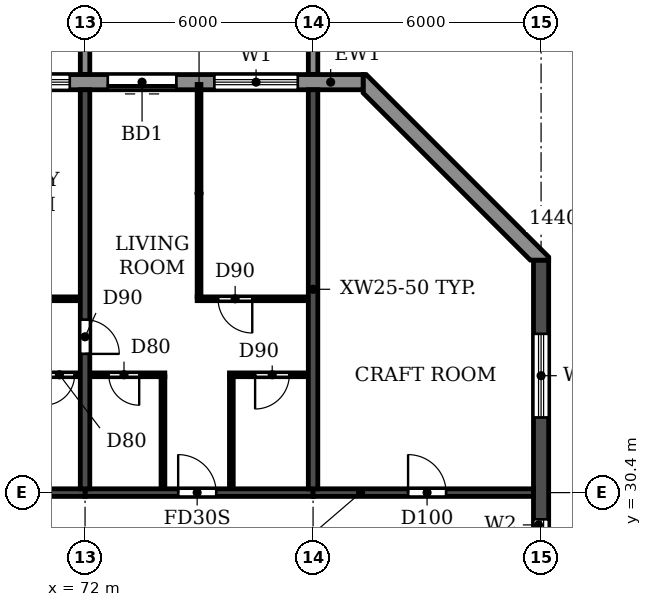
"""IFC4 building model, lengths in metres.
Left out: names, types, materials, properties, quantities, classifications, styles, units other than length and angle.
Written with IfcOpenShell. Run it as: python <this file> out.ifc"""

import sys

from ifc_helpers import new_model, si_unit, direction, frame, frame_2d, origin, place, context, subcontext, project, spatial, polyline, rectangle, outline, extrude, source, transform, mapped, element, fill, save


model = new_model("IFC4")
c1 = context("Model", 3, precision=1e-05, world=origin(), true_north=direction((0.0, 1.0)))
c2 = subcontext(c1, "Body", "Model", "MODEL_VIEW")
j1 = project(units=[si_unit("LENGTHUNIT", "METRE"), si_unit("PLANEANGLEUNIT", "RADIAN")], contexts=[c1])
p1 = place(None, origin())
s1 = spatial("IfcSite", under=j1, at=p1, CompositionType="ELEMENT")
p2 = place(p1, origin())
s2 = spatial("IfcBuilding", under=s1, at=p2, CompositionType="ELEMENT")
p3 = place(p2, frame((0.0, 0.0, 208.2)))
s3 = spatial("IfcBuildingStorey", under=s2, at=p3, CompositionType="ELEMENT", Elevation=208.2)
p4 = place(p3, frame((72.0, 30.5, 0.0), z_axis=(0.0, 0.0, 1.0), x_axis=(0.0, 1.0, 0.0)))
e1 = element("IfcWall", 1, at=p4, inside=s3, PredefinedType="SHEAR", context=c2, shape_type="SweptSolid", body=[
    extrude(rectangle(XDim=10.5, YDim=0.25, at=frame_2d((5.25, 0.0))), origin(), (0.0, 0.0, 1.0), 3.0),
])
p5 = place(p4, frame((3.55, 0.0, 0.0)))
e2 = element("IfcOpeningElement", 2, at=p5, cuts=e1, PredefinedType="OPENING", context=c2, shape_type="SweptSolid", body=[
    extrude(rectangle(XDim=0.9, YDim=2.1, at=frame_2d((0.45, 1.05))), frame((0.0, 0.135, 0.0), z_axis=(0.0, -1.0, 0.0), x_axis=(1.0, 0.0, 0.0)), (0.0, 0.0, 1.0), 0.27),
])
p6 = place(p3, frame((78.0, 30.5, 0.0), z_axis=(0.0, 0.0, 1.0), x_axis=(0.0, 1.0, 0.0)))
e3 = element("IfcWall", 3, at=p6, inside=s3, PredefinedType="SHEAR", context=c2, shape_type="SweptSolid", body=[
    extrude(rectangle(XDim=10.5, YDim=0.25, at=frame_2d((5.25, 0.0))), origin(), (0.0, 0.0, 1.0), 3.0),
])
p7 = place(p3, frame((84.0, 4.683, 0.0), z_axis=(0.0, 0.0, 1.0), x_axis=(0.0, 1.0, 0.0)))
e4 = element("IfcWall", 4, at=p7, inside=s3, PredefinedType="SHEAR", context=c2, shape_type="SweptSolid", body=[
    extrude(rectangle(XDim=31.834, YDim=0.4, at=frame_2d((15.917, 0.0))), origin(), (0.0, 0.0, 1.0), 3.0),
])
p8 = place(p7, frame((23.817, 0.0, 0.9)))
e5 = element("IfcOpeningElement", 5, at=p8, cuts=e4, PredefinedType="OPENING", context=c2, shape_type="SweptSolid", body=[
    extrude(rectangle(XDim=1.2, YDim=1.5, at=frame_2d((0.6, 0.75))), frame((0.0, 0.21, 0.0), z_axis=(0.0, -1.0, 0.0), x_axis=(1.0, 0.0, 0.0)), (0.0, 0.0, 1.0), 0.42),
])
p9 = place(p7, frame((8.017, 0.0, 0.9)))
e6 = element("IfcOpeningElement", 6, at=p9, cuts=e4, PredefinedType="OPENING", context=c2, shape_type="SweptSolid", body=[
    extrude(rectangle(XDim=1.2, YDim=1.5, at=frame_2d((0.6, 0.75))), frame((0.0, 0.21, 0.0), z_axis=(0.0, -1.0, 0.0), x_axis=(1.0, 0.0, 0.0)), (0.0, 0.0, 1.0), 0.42),
])
p10 = place(p7, frame((27.694, 0.0, 0.6)))
e7 = element("IfcOpeningElement", 7, at=p10, cuts=e4, PredefinedType="OPENING", context=c2, shape_type="SweptSolid", body=[
    extrude(rectangle(XDim=2.2, YDim=1.8, at=frame_2d((1.1, 0.9))), frame((0.0, 0.21, 0.0), z_axis=(0.0, -1.0, 0.0), x_axis=(1.0, 0.0, 0.0)), (0.0, 0.0, 1.0), 0.42),
])
p11 = place(p7, frame((2.541, 0.0, 0.6)))
e8 = element("IfcOpeningElement", 8, at=p11, cuts=e4, PredefinedType="OPENING", context=c2, shape_type="SweptSolid", body=[
    extrude(rectangle(XDim=2.2, YDim=1.8, at=frame_2d((1.1, 0.9))), frame((0.0, 0.21, 0.0), z_axis=(0.0, -1.0, 0.0), x_axis=(1.0, 0.0, 0.0)), (0.0, 0.0, 1.0), 0.42),
])
p12 = place(p7, frame((15.917, 0.0, 0.9)))
e9 = element("IfcOpeningElement", 9, at=p12, cuts=e4, PredefinedType="OPENING", context=c2, shape_type="SweptSolid", body=[
    extrude(rectangle(XDim=1.2, YDim=1.5, at=frame_2d((0.6, 0.75))), frame((0.0, 0.21, 0.0), z_axis=(0.0, -1.0, 0.0), x_axis=(1.0, 0.0, 0.0)), (0.0, 0.0, 1.0), 0.42),
])
p13 = place(p3, frame((66.0, 30.4, 0.0), z_axis=(0.0, 0.0, 1.0), x_axis=(1.0, 0.0, 0.0)))
e10 = element("IfcWall", 10, at=p13, inside=s3, PredefinedType="SHEAR", context=c2, shape_type="SweptSolid", body=[
    extrude(rectangle(XDim=6.0, YDim=0.2, at=frame_2d((3.0, 0.0))), origin(), (0.0, 0.0, 1.0), 2.4),
])
p14 = place(p3, frame((72.0, 30.4, 0.0), z_axis=(0.0, 0.0, 1.0), x_axis=(1.0, 0.0, 0.0)))
e11 = element("IfcWall", 11, at=p14, inside=s3, PredefinedType="SHEAR", context=c2, shape_type="SweptSolid", body=[
    extrude(rectangle(XDim=6.0, YDim=0.2, at=frame_2d((3.0, 0.0))), origin(), (0.0, 0.0, 1.0), 2.4),
])
p15 = place(p14, frame((2.45, 0.0, 0.0)))
e12 = element("IfcOpeningElement", 12, at=p15, cuts=e11, PredefinedType="OPENING", context=c2, shape_type="SweptSolid", body=[
    extrude(rectangle(XDim=1.0, YDim=2.1, at=frame_2d((0.5, 1.05))), frame((0.0, 0.11, 0.0), z_axis=(0.0, -1.0, 0.0), x_axis=(1.0, 0.0, 0.0)), (0.0, 0.0, 1.0), 0.22),
])
p16 = place(p3, frame((78.0, 30.4, 0.0), z_axis=(0.0, 0.0, 1.0), x_axis=(1.0, 0.0, 0.0)))
e13 = element("IfcWall", 13, at=p16, inside=s3, PredefinedType="SHEAR", context=c2, shape_type="SweptSolid", body=[
    extrude(rectangle(XDim=5.8, YDim=0.2, at=frame_2d((2.9, 0.0))), origin(), (0.0, 0.0, 1.0), 2.4),
])
p17 = place(p16, frame((2.5, 0.0, 0.0)))
e14 = element("IfcOpeningElement", 14, at=p17, cuts=e13, PredefinedType="OPENING", context=c2, shape_type="SweptSolid", body=[
    extrude(rectangle(XDim=1.0, YDim=2.1, at=frame_2d((0.5, 1.05))), frame((0.0, 0.11, 0.0), z_axis=(0.0, -1.0, 0.0), x_axis=(1.0, 0.0, 0.0)), (0.0, 0.0, 1.0), 0.22),
])
p18 = place(p3, origin())
e15 = element("IfcWall", 15, at=p18, inside=s3, PredefinedType="STANDARD", context=c2, shape_type="SweptSolid", body=[
    extrude(outline(polyline([(84.2, 36.517), (84.2, 36.6), (79.4, 41.4), (79.317, 41.4), (79.317, 40.917), (83.717, 36.517), (84.2, 36.517)])), origin(), (0.0, 0.0, 1.0), 3.0),
])
p19 = place(p3, frame((79.317, 41.2, 0.0), z_axis=(0.0, 0.0, 1.0), x_axis=(-1.0, 0.0, 0.0)))
e16 = element("IfcWall", 16, at=p19, inside=s3, PredefinedType="STANDARD", context=c2, shape_type="SweptSolid", body=[
    extrude(rectangle(XDim=56.634, YDim=0.4, at=frame_2d((28.317, 0.0))), origin(), (0.0, 0.0, 1.0), 3.0),
])
p20 = place(p19, frame((52.717, 0.0, 0.9)))
e17 = element("IfcOpeningElement", 17, at=p20, cuts=e16, PredefinedType="OPENING", context=c2, shape_type="SweptSolid", body=[
    extrude(rectangle(XDim=2.2, YDim=1.5, at=frame_2d((1.1, 0.75))), frame((0.0, 0.21, 0.0), z_axis=(0.0, -1.0, 0.0), x_axis=(1.0, 0.0, 0.0)), (0.0, 0.0, 1.0), 0.42),
])
p21 = place(p19, frame((49.917, 0.0, 0.0)))
e18 = element("IfcOpeningElement", 18, at=p21, cuts=e16, PredefinedType="OPENING", context=c2, shape_type="SweptSolid", body=[
    extrude(rectangle(XDim=1.8, YDim=2.4, at=frame_2d((0.9, 1.2))), frame((0.0, 0.21, 0.0), z_axis=(0.0, -1.0, 0.0), x_axis=(1.0, 0.0, 0.0)), (0.0, 0.0, 1.0), 0.42),
])
p22 = place(p19, frame((46.717, 0.0, 0.9)))
e19 = element("IfcOpeningElement", 19, at=p22, cuts=e16, PredefinedType="OPENING", context=c2, shape_type="SweptSolid", body=[
    extrude(rectangle(XDim=2.2, YDim=1.5, at=frame_2d((1.1, 0.75))), frame((0.0, 0.21, 0.0), z_axis=(0.0, -1.0, 0.0), x_axis=(1.0, 0.0, 0.0)), (0.0, 0.0, 1.0), 0.42),
])
p23 = place(p19, frame((43.917, 0.0, 0.0)))
e20 = element("IfcOpeningElement", 20, at=p23, cuts=e16, PredefinedType="OPENING", context=c2, shape_type="SweptSolid", body=[
    extrude(rectangle(XDim=1.8, YDim=2.4, at=frame_2d((0.9, 1.2))), frame((0.0, 0.21, 0.0), z_axis=(0.0, -1.0, 0.0), x_axis=(1.0, 0.0, 0.0)), (0.0, 0.0, 1.0), 0.42),
])
p24 = place(p19, frame((40.917, 0.0, 0.0)))
e21 = element("IfcOpeningElement", 21, at=p24, cuts=e16, PredefinedType="OPENING", context=c2, shape_type="SweptSolid", body=[
    extrude(rectangle(XDim=1.8, YDim=2.4, at=frame_2d((0.9, 1.2))), frame((0.0, 0.21, 0.0), z_axis=(0.0, -1.0, 0.0), x_axis=(1.0, 0.0, 0.0)), (0.0, 0.0, 1.0), 0.42),
])
p25 = place(p19, frame((37.717, 0.0, 0.9)))
e22 = element("IfcOpeningElement", 22, at=p25, cuts=e16, PredefinedType="OPENING", context=c2, shape_type="SweptSolid", body=[
    extrude(rectangle(XDim=2.2, YDim=1.5, at=frame_2d((1.1, 0.75))), frame((0.0, 0.21, 0.0), z_axis=(0.0, -1.0, 0.0), x_axis=(1.0, 0.0, 0.0)), (0.0, 0.0, 1.0), 0.42),
])
p26 = place(p19, frame((34.717, 0.0, 0.9)))
e23 = element("IfcOpeningElement", 23, at=p26, cuts=e16, PredefinedType="OPENING", context=c2, shape_type="SweptSolid", body=[
    extrude(rectangle(XDim=2.2, YDim=1.5, at=frame_2d((1.1, 0.75))), frame((0.0, 0.21, 0.0), z_axis=(0.0, -1.0, 0.0), x_axis=(1.0, 0.0, 0.0)), (0.0, 0.0, 1.0), 0.42),
])
p27 = place(p19, frame((31.717, 0.0, 0.9)))
e24 = element("IfcOpeningElement", 24, at=p27, cuts=e16, PredefinedType="OPENING", context=c2, shape_type="SweptSolid", body=[
    extrude(rectangle(XDim=2.2, YDim=1.5, at=frame_2d((1.1, 0.75))), frame((0.0, 0.21, 0.0), z_axis=(0.0, -1.0, 0.0), x_axis=(1.0, 0.0, 0.0)), (0.0, 0.0, 1.0), 0.42),
])
p28 = place(p19, frame((28.717, 0.0, 0.9)))
e25 = element("IfcOpeningElement", 25, at=p28, cuts=e16, PredefinedType="OPENING", context=c2, shape_type="SweptSolid", body=[
    extrude(rectangle(XDim=2.2, YDim=1.5, at=frame_2d((1.1, 0.75))), frame((0.0, 0.21, 0.0), z_axis=(0.0, -1.0, 0.0), x_axis=(1.0, 0.0, 0.0)), (0.0, 0.0, 1.0), 0.42),
])
p29 = place(p19, frame((25.917, 0.0, 0.0)))
e26 = element("IfcOpeningElement", 26, at=p29, cuts=e16, PredefinedType="OPENING", context=c2, shape_type="SweptSolid", body=[
    extrude(rectangle(XDim=1.8, YDim=2.4, at=frame_2d((0.9, 1.2))), frame((0.0, 0.21, 0.0), z_axis=(0.0, -1.0, 0.0), x_axis=(1.0, 0.0, 0.0)), (0.0, 0.0, 1.0), 0.42),
])
p30 = place(p19, frame((22.717, 0.0, 0.9)))
e27 = element("IfcOpeningElement", 27, at=p30, cuts=e16, PredefinedType="OPENING", context=c2, shape_type="SweptSolid", body=[
    extrude(rectangle(XDim=2.2, YDim=1.5, at=frame_2d((1.1, 0.75))), frame((0.0, 0.21, 0.0), z_axis=(0.0, -1.0, 0.0), x_axis=(1.0, 0.0, 0.0)), (0.0, 0.0, 1.0), 0.42),
])
p31 = place(p19, frame((19.717, 0.0, 0.9)))
e28 = element("IfcOpeningElement", 28, at=p31, cuts=e16, PredefinedType="OPENING", context=c2, shape_type="SweptSolid", body=[
    extrude(rectangle(XDim=2.2, YDim=1.5, at=frame_2d((1.1, 0.75))), frame((0.0, 0.21, 0.0), z_axis=(0.0, -1.0, 0.0), x_axis=(1.0, 0.0, 0.0)), (0.0, 0.0, 1.0), 0.42),
])
p32 = place(p19, frame((16.917, 0.0, 0.0)))
e29 = element("IfcOpeningElement", 29, at=p32, cuts=e16, PredefinedType="OPENING", context=c2, shape_type="SweptSolid", body=[
    extrude(rectangle(XDim=1.8, YDim=2.4, at=frame_2d((0.9, 1.2))), frame((0.0, 0.21, 0.0), z_axis=(0.0, -1.0, 0.0), x_axis=(1.0, 0.0, 0.0)), (0.0, 0.0, 1.0), 0.42),
])
p33 = place(p19, frame((13.717, 0.0, 0.9)))
e30 = element("IfcOpeningElement", 30, at=p33, cuts=e16, PredefinedType="OPENING", context=c2, shape_type="SweptSolid", body=[
    extrude(rectangle(XDim=2.2, YDim=1.5, at=frame_2d((1.1, 0.75))), frame((0.0, 0.21, 0.0), z_axis=(0.0, -1.0, 0.0), x_axis=(1.0, 0.0, 0.0)), (0.0, 0.0, 1.0), 0.42),
])
p34 = place(p19, frame((10.717, 0.0, 0.9)))
e31 = element("IfcOpeningElement", 31, at=p34, cuts=e16, PredefinedType="OPENING", context=c2, shape_type="SweptSolid", body=[
    extrude(rectangle(XDim=2.2, YDim=1.5, at=frame_2d((1.1, 0.75))), frame((0.0, 0.21, 0.0), z_axis=(0.0, -1.0, 0.0), x_axis=(1.0, 0.0, 0.0)), (0.0, 0.0, 1.0), 0.42),
])
p35 = place(p19, frame((7.717, 0.0, 0.9)))
e32 = element("IfcOpeningElement", 32, at=p35, cuts=e16, PredefinedType="OPENING", context=c2, shape_type="SweptSolid", body=[
    extrude(rectangle(XDim=2.2, YDim=1.5, at=frame_2d((1.1, 0.75))), frame((0.0, 0.21, 0.0), z_axis=(0.0, -1.0, 0.0), x_axis=(1.0, 0.0, 0.0)), (0.0, 0.0, 1.0), 0.42),
])
p36 = place(p19, frame((4.917, 0.0, 0.0)))
e33 = element("IfcOpeningElement", 33, at=p36, cuts=e16, PredefinedType="OPENING", context=c2, shape_type="SweptSolid", body=[
    extrude(rectangle(XDim=1.8, YDim=2.4, at=frame_2d((0.9, 1.2))), frame((0.0, 0.21, 0.0), z_axis=(0.0, -1.0, 0.0), x_axis=(1.0, 0.0, 0.0)), (0.0, 0.0, 1.0), 0.42),
])
p37 = place(p19, frame((1.717, 0.0, 0.9)))
e34 = element("IfcOpeningElement", 34, at=p37, cuts=e16, PredefinedType="OPENING", context=c2, shape_type="SweptSolid", body=[
    extrude(rectangle(XDim=2.2, YDim=1.5, at=frame_2d((1.1, 0.75))), frame((0.0, 0.21, 0.0), z_axis=(0.0, -1.0, 0.0), x_axis=(1.0, 0.0, 0.0)), (0.0, 0.0, 1.0), 0.42),
])
m1 = source(origin(), c2, "Body", "SweptSolid", [
    extrude(outline(polyline([(0.0, 0.0), (0.25, 0.0), (0.25, 3.1), (0.0, 3.1), (0.0, 0.0)])), origin(), (0.0, 0.0, 1.0), 3.1),
])
for number, where in (
    (35, (71.875, 41.4, 0.0)),
    (36, (77.875, 41.4, 0.0)),
):
    element("IfcWall", number, at=place(p3, frame(where)), inside=s3, PredefinedType="STANDARD", context=c2, shape_type="MappedRepresentation", body=[
        mapped(m1, transform((0.0, 0.0, 0.0))),
    ])
p38 = place(p3, frame((69.1, 33.5, 0.0), z_axis=(0.0, 0.0, 1.0), x_axis=(1.0, 0.0, 0.0)))
e37 = element("IfcWall", 37, at=p38, inside=s3, PredefinedType="PARTITIONING", context=c2, shape_type="SweptSolid", body=[
    extrude(rectangle(XDim=2.765, YDim=0.1, at=frame_2d((1.382, 0.0))), origin(), (0.0, 0.0, 1.0), 3.0),
])
p39 = place(p38, frame((0.325, 0.0, 0.0)))
e38 = element("IfcOpeningElement", 38, at=p39, cuts=e37, PredefinedType="OPENING", context=c2, shape_type="SweptSolid", body=[
    extrude(rectangle(XDim=0.8, YDim=2.1, at=frame_2d((0.4, 1.05))), frame((0.0, 0.06, 0.0), z_axis=(0.0, -1.0, 0.0), x_axis=(1.0, 0.0, 0.0)), (0.0, 0.0, 1.0), 0.12),
])
p40 = place(p38, frame((1.825, 0.0, 0.0)))
e39 = element("IfcOpeningElement", 39, at=p40, cuts=e37, PredefinedType="OPENING", context=c2, shape_type="SweptSolid", body=[
    extrude(rectangle(XDim=0.8, YDim=2.1, at=frame_2d((0.4, 1.05))), frame((0.0, 0.06, 0.0), z_axis=(0.0, -1.0, 0.0), x_axis=(1.0, 0.0, 0.0)), (0.0, 0.0, 1.0), 0.12),
])
p41 = place(p3, frame((72.135, 33.5, 0.0), z_axis=(0.0, 0.0, 1.0), x_axis=(1.0, 0.0, 0.0)))
e40 = element("IfcWall", 40, at=p41, inside=s3, PredefinedType="PARTITIONING", context=c2, shape_type="SweptSolid", body=[
    extrude(rectangle(XDim=1.965, YDim=0.1, at=frame_2d((0.982, 0.0))), origin(), (0.0, 0.0, 1.0), 3.0),
])
p42 = place(p41, frame((0.49, 0.0, 0.0)))
e41 = element("IfcOpeningElement", 41, at=p42, cuts=e40, PredefinedType="OPENING", context=c2, shape_type="SweptSolid", body=[
    extrude(rectangle(XDim=0.8, YDim=2.1, at=frame_2d((0.4, 1.05))), frame((0.0, 0.06, 0.0), z_axis=(0.0, -1.0, 0.0), x_axis=(1.0, 0.0, 0.0)), (0.0, 0.0, 1.0), 0.12),
])
p43 = place(p3, frame((75.8, 33.5, 0.0), z_axis=(0.0, 0.0, 1.0), x_axis=(1.0, 0.0, 0.0)))
e42 = element("IfcWall", 42, at=p43, inside=s3, PredefinedType="PARTITIONING", context=c2, shape_type="SweptSolid", body=[
    extrude(rectangle(XDim=2.065, YDim=0.1, at=frame_2d((1.032, 0.0))), origin(), (0.0, 0.0, 1.0), 3.0),
])
p44 = place(p43, frame((0.675, 0.0, 0.0)))
e43 = element("IfcOpeningElement", 43, at=p44, cuts=e42, PredefinedType="OPENING", context=c2, shape_type="SweptSolid", body=[
    extrude(rectangle(XDim=0.9, YDim=2.1, at=frame_2d((0.45, 1.05))), frame((0.0, 0.06, 0.0), z_axis=(0.0, -1.0, 0.0), x_axis=(1.0, 0.0, 0.0)), (0.0, 0.0, 1.0), 0.12),
])
p45 = place(p3, frame((69.1, 35.5, 0.0), z_axis=(0.0, 0.0, 1.0), x_axis=(1.0, 0.0, 0.0)))
e44 = element("IfcWall", 44, at=p45, inside=s3, PredefinedType="PARTITIONING", context=c2, shape_type="SweptSolid", body=[
    extrude(rectangle(XDim=2.765, YDim=0.1, at=frame_2d((1.382, 0.0))), origin(), (0.0, 0.0, 1.0), 3.0),
])
p46 = place(p45, frame((0.4, 0.0, 0.0)))
e45 = element("IfcOpeningElement", 45, at=p46, cuts=e44, PredefinedType="OPENING", context=c2, shape_type="SweptSolid", body=[
    extrude(rectangle(XDim=0.9, YDim=2.1, at=frame_2d((0.45, 1.05))), frame((0.0, 0.06, 0.0), z_axis=(0.0, -1.0, 0.0), x_axis=(1.0, 0.0, 0.0)), (0.0, 0.0, 1.0), 0.12),
])
p47 = place(p3, frame((74.95, 35.5, 0.0), z_axis=(0.0, 0.0, 1.0), x_axis=(1.0, 0.0, 0.0)))
e46 = element("IfcWall", 46, at=p47, inside=s3, PredefinedType="PARTITIONING", context=c2, shape_type="SweptSolid", body=[
    extrude(rectangle(XDim=2.915, YDim=0.1, at=frame_2d((1.458, 0.0))), origin(), (0.0, 0.0, 1.0), 3.0),
])
p48 = place(p47, frame((0.55, 0.0, 0.0)))
e47 = element("IfcOpeningElement", 47, at=p48, cuts=e46, PredefinedType="OPENING", context=c2, shape_type="SweptSolid", body=[
    extrude(rectangle(XDim=0.9, YDim=2.1, at=frame_2d((0.45, 1.05))), frame((0.0, 0.06, 0.0), z_axis=(0.0, -1.0, 0.0), x_axis=(1.0, 0.0, 0.0)), (0.0, 0.0, 1.0), 0.12),
])
p49 = place(p3, frame((74.05, 30.51, 0.0), z_axis=(0.0, 0.0, 1.0), x_axis=(0.0, 1.0, 0.0)))
e48 = element("IfcWall", 48, at=p49, inside=s3, PredefinedType="PARTITIONING", context=c2, shape_type="SweptSolid", body=[
    extrude(rectangle(XDim=2.94, YDim=0.1, at=frame_2d((1.47, 0.0))), origin(), (0.0, 0.0, 1.0), 3.0),
])
p50 = place(p3, frame((75.0, 35.55, 0.0), z_axis=(0.0, 0.0, 1.0), x_axis=(0.0, 1.0, 0.0)))
e49 = element("IfcWall", 49, at=p50, inside=s3, PredefinedType="PARTITIONING", context=c2, shape_type="SweptSolid", body=[
    extrude(rectangle(XDim=5.59, YDim=0.1, at=frame_2d((2.795, 0.0))), origin(), (0.0, 0.0, 1.0), 3.0),
])
p51 = place(p3, frame((75.85, 30.51, 0.0), z_axis=(0.0, 0.0, 1.0), x_axis=(0.0, 1.0, 0.0)))
e50 = element("IfcWall", 50, at=p51, inside=s3, PredefinedType="PARTITIONING", context=c2, shape_type="SweptSolid", body=[
    extrude(rectangle(XDim=2.94, YDim=0.1, at=frame_2d((1.47, 0.0))), origin(), (0.0, 0.0, 1.0), 3.0),
])
p52 = place(p8, origin())
e51 = element("IfcWindow", 51, at=p52, inside=s3, PartitioningType="SINGLE_PANEL", PredefinedType="WINDOW", context=c2, shape_type="SweptSolid", body=[
    extrude(rectangle(XDim=1.2, YDim=1.5, at=frame_2d((0.6, 0.75))), frame((0.0, 0.03, 0.0), z_axis=(0.0, -1.0, 0.0), x_axis=(1.0, 0.0, 0.0)), (0.0, 0.0, 1.0), 0.06),
])
fill(e5, e51)
p53 = place(p10, origin())
e52 = element("IfcWindow", 52, at=p53, inside=s3, PartitioningType="DOUBLE_PANEL_HORIZONTAL", PredefinedType="WINDOW", context=c2, shape_type="SweptSolid", body=[
    extrude(rectangle(XDim=2.2, YDim=1.8, at=frame_2d((1.1, 0.9))), frame((0.0, 0.03, 0.0), z_axis=(0.0, -1.0, 0.0), x_axis=(1.0, 0.0, 0.0)), (0.0, 0.0, 1.0), 0.06),
])
fill(e7, e52)
p54 = place(p35, origin())
e53 = element("IfcWindow", 53, at=p54, inside=s3, PartitioningType="DOUBLE_PANEL_HORIZONTAL", PredefinedType="WINDOW", context=c2, shape_type="SweptSolid", body=[
    extrude(rectangle(XDim=2.2, YDim=1.5, at=frame_2d((1.1, 0.75))), frame((0.0, 0.03, 0.0), z_axis=(0.0, -1.0, 0.0), x_axis=(1.0, 0.0, 0.0)), (0.0, 0.0, 1.0), 0.06),
])
fill(e32, e53)
p55 = place(p36, origin())
e54 = element("IfcDoor", 54, at=p55, inside=s3, OperationType="DOUBLE_DOOR_SLIDING", PredefinedType="DOOR", context=c2, shape_type="SweptSolid", body=[
    extrude(rectangle(XDim=1.8, YDim=2.4, at=frame_2d((0.9, 1.2))), frame((0.0, 0.025, 0.0), z_axis=(0.0, -1.0, 0.0), x_axis=(1.0, 0.0, 0.0)), (0.0, 0.0, 1.0), 0.05),
])
fill(e33, e54)
p56 = place(p37, origin())
e55 = element("IfcWindow", 55, at=p56, inside=s3, PartitioningType="DOUBLE_PANEL_HORIZONTAL", PredefinedType="WINDOW", context=c2, shape_type="SweptSolid", body=[
    extrude(rectangle(XDim=2.2, YDim=1.5, at=frame_2d((1.1, 0.75))), frame((0.0, 0.03, 0.0), z_axis=(0.0, -1.0, 0.0), x_axis=(1.0, 0.0, 0.0)), (0.0, 0.0, 1.0), 0.06),
])
fill(e34, e55)
p57 = place(p40, frame((0.8, 0.0, 0.0), z_axis=(0.0, 0.0, 1.0), x_axis=(-1.0, 0.0, 0.0)))
e56 = element("IfcDoor", 56, at=p57, inside=s3, OperationType="SINGLE_SWING_RIGHT", PredefinedType="DOOR", context=c2, shape_type="SweptSolid", body=[
    extrude(rectangle(XDim=0.8, YDim=2.1, at=frame_2d((0.4, 1.05))), frame((0.0, 0.025, 0.0), z_axis=(0.0, -1.0, 0.0), x_axis=(1.0, 0.0, 0.0)), (0.0, 0.0, 1.0), 0.05),
])
fill(e39, e56)
p58 = place(p5, frame((0.9, 0.0, 0.0), z_axis=(0.0, 0.0, 1.0), x_axis=(-1.0, 0.0, 0.0)))
e57 = element("IfcDoor", 57, at=p58, inside=s3, OperationType="SINGLE_SWING_RIGHT", PredefinedType="DOOR", context=c2, shape_type="SweptSolid", body=[
    extrude(rectangle(XDim=0.9, YDim=2.1, at=frame_2d((0.45, 1.05))), frame((0.0, 0.025, 0.0), z_axis=(0.0, -1.0, 0.0), x_axis=(1.0, 0.0, 0.0)), (0.0, 0.0, 1.0), 0.05),
])
fill(e2, e57)
p59 = place(p42, frame((0.8, 0.0, 0.0), z_axis=(0.0, 0.0, 1.0), x_axis=(-1.0, 0.0, 0.0)))
e58 = element("IfcDoor", 58, at=p59, inside=s3, OperationType="SINGLE_SWING_LEFT", PredefinedType="DOOR", context=c2, shape_type="SweptSolid", body=[
    extrude(rectangle(XDim=0.8, YDim=2.1, at=frame_2d((0.4, 1.05))), frame((0.0, 0.025, 0.0), z_axis=(0.0, -1.0, 0.0), x_axis=(1.0, 0.0, 0.0)), (0.0, 0.0, 1.0), 0.05),
])
fill(e41, e58)
p60 = place(p15, origin())
e59 = element("IfcDoor", 59, at=p60, inside=s3, OperationType="SINGLE_SWING_LEFT", PredefinedType="DOOR", context=c2, shape_type="SweptSolid", body=[
    extrude(rectangle(XDim=1.0, YDim=2.1, at=frame_2d((0.5, 1.05))), frame((0.0, 0.025, 0.0), z_axis=(0.0, -1.0, 0.0), x_axis=(1.0, 0.0, 0.0)), (0.0, 0.0, 1.0), 0.05),
])
fill(e12, e59)
p61 = place(p48, frame((0.9, 0.0, 0.0), z_axis=(0.0, 0.0, 1.0), x_axis=(-1.0, 0.0, 0.0)))
e60 = element("IfcDoor", 60, at=p61, inside=s3, OperationType="SINGLE_SWING_LEFT", PredefinedType="DOOR", context=c2, shape_type="SweptSolid", body=[
    extrude(rectangle(XDim=0.9, YDim=2.1, at=frame_2d((0.45, 1.05))), frame((0.0, 0.025, 0.0), z_axis=(0.0, -1.0, 0.0), x_axis=(1.0, 0.0, 0.0)), (0.0, 0.0, 1.0), 0.05),
])
fill(e47, e60)
p62 = place(p44, frame((0.9, 0.0, 0.0), z_axis=(0.0, 0.0, 1.0), x_axis=(-1.0, 0.0, 0.0)))
e61 = element("IfcDoor", 61, at=p62, inside=s3, OperationType="SINGLE_SWING_RIGHT", PredefinedType="DOOR", context=c2, shape_type="SweptSolid", body=[
    extrude(rectangle(XDim=0.9, YDim=2.1, at=frame_2d((0.45, 1.05))), frame((0.0, 0.025, 0.0), z_axis=(0.0, -1.0, 0.0), x_axis=(1.0, 0.0, 0.0)), (0.0, 0.0, 1.0), 0.05),
])
fill(e43, e61)
p63 = place(p17, origin())
e62 = element("IfcDoor", 62, at=p63, inside=s3, OperationType="SINGLE_SWING_LEFT", PredefinedType="DOOR", context=c2, shape_type="SweptSolid", body=[
    extrude(rectangle(XDim=1.0, YDim=2.1, at=frame_2d((0.5, 1.05))), frame((0.0, 0.025, 0.0), z_axis=(0.0, -1.0, 0.0), x_axis=(1.0, 0.0, 0.0)), (0.0, 0.0, 1.0), 0.05),
])
fill(e14, e62)
save(model, sys.argv[1])
